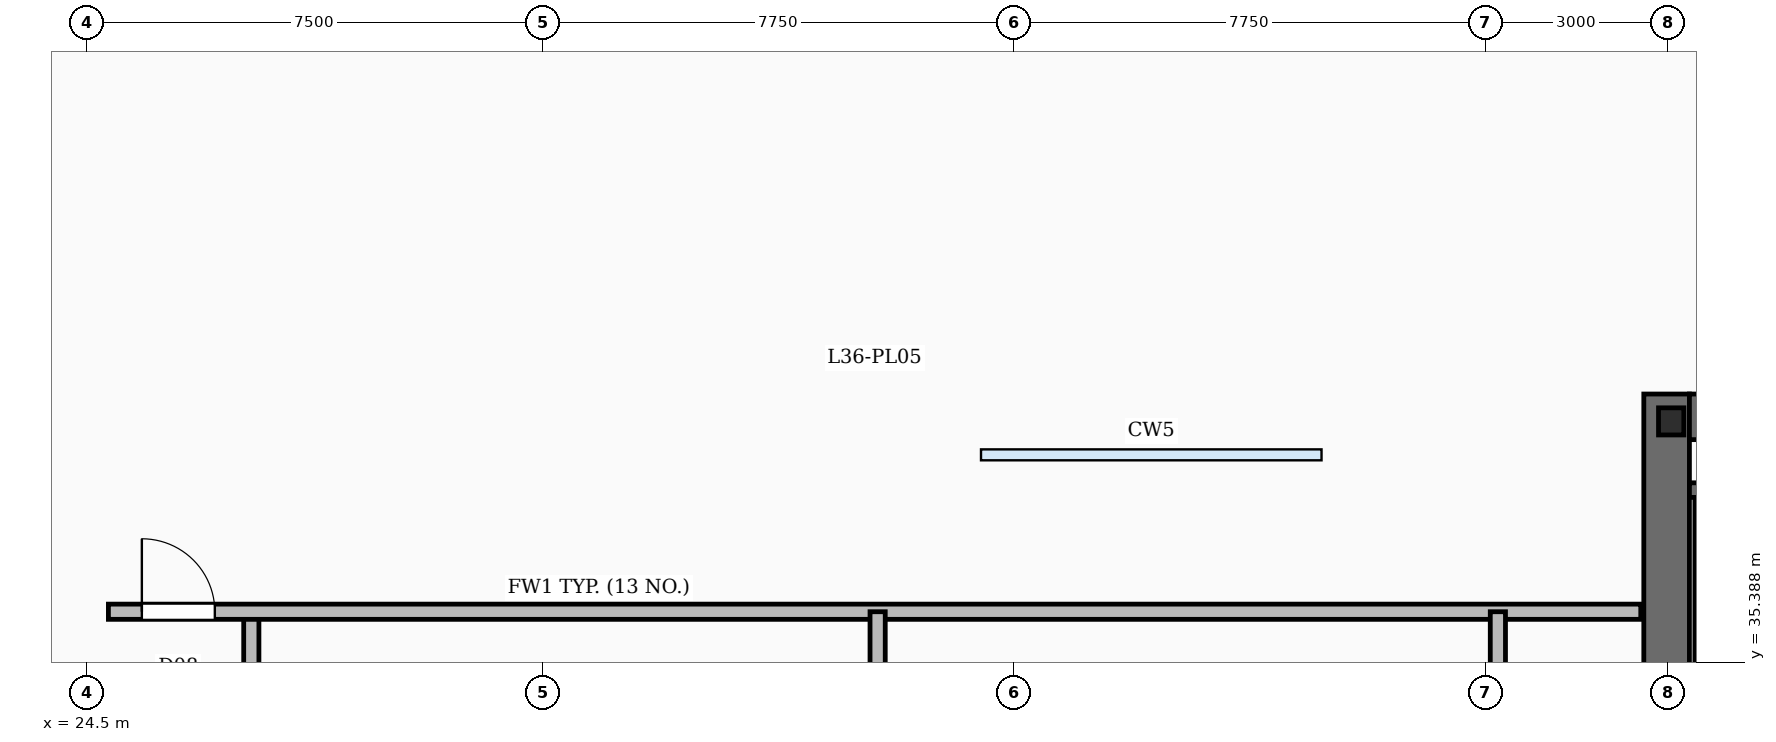
"""IFC4 building model, lengths in metres.
Left out: names, types, materials, properties, quantities, classifications, styles, units other than length and angle.
Written with IfcOpenShell. Run it as: python <this file> out.ifc"""

import sys

from ifc_helpers import new_model, si_unit, direction, frame, frame_2d, origin, origin_2d, place, context, subcontext, project, spatial, rectangle, i_section, extrude, element, fill, save


model = new_model("IFC4")
c1 = context("Model", 3, precision=1e-05, world=origin(), true_north=direction((0.0, 1.0)))
c2 = subcontext(c1, "Body", "Model", "MODEL_VIEW")
j1 = project(units=[si_unit("LENGTHUNIT", "METRE"), si_unit("PLANEANGLEUNIT", "RADIAN")], contexts=[c1])
p1 = place(None, origin())
s1 = spatial("IfcSite", under=j1, at=p1, CompositionType="ELEMENT")
p2 = place(p1, origin())
s2 = spatial("IfcBuilding", under=s1, at=p2, CompositionType="ELEMENT")
p3 = place(p2, frame((0.0, 0.0, 153.25)))
s3 = spatial("IfcBuildingStorey", under=s2, at=p3, CompositionType="ELEMENT", Elevation=153.25)
p4 = place(p3, frame((50.475, 19.0, -0.42), z_axis=(0.0, 0.0, 1.0), x_axis=(0.0, 1.0, 0.0)))
e1 = element("IfcWall", 1, at=p4, inside=s3, PredefinedType="SHEAR", context=c2, shape_type="SweptSolid", body=[
    extrude(rectangle(XDim=20.8, YDim=0.75, at=frame_2d((10.4, 0.0))), origin(), (0.0, 0.0, 1.0), 5.17),
])
p5 = place(p4, frame((2.5, 0.0, 0.42)))
e2 = element("IfcOpeningElement", 2, at=p5, cuts=e1, PredefinedType="OPENING", context=c2, shape_type="SweptSolid", body=[
    extrude(rectangle(XDim=1.05, YDim=2.15, at=frame_2d((0.525, 1.075))), frame((0.0, 0.385, 0.0), z_axis=(0.0, -1.0, 0.0), x_axis=(1.0, 0.0, 0.0)), (0.0, 0.0, 1.0), 0.77),
])
p6 = place(p4, frame((8.65, 0.0, 0.42)))
e3 = element("IfcOpeningElement", 3, at=p6, cuts=e1, PredefinedType="OPENING", context=c2, shape_type="SweptSolid", body=[
    extrude(rectangle(XDim=1.05, YDim=2.15, at=frame_2d((0.525, 1.075))), frame((0.0, 0.385, 0.0), z_axis=(0.0, -1.0, 0.0), x_axis=(1.0, 0.0, 0.0)), (0.0, 0.0, 1.0), 0.77),
])
p7 = place(p4, frame((14.62, 0.0, 0.42)))
e4 = element("IfcOpeningElement", 4, at=p7, cuts=e1, PredefinedType="OPENING", context=c2, shape_type="SweptSolid", body=[
    extrude(rectangle(XDim=1.1, YDim=2.15, at=frame_2d((0.55, 1.075))), frame((0.0, 0.385, 0.0), z_axis=(0.0, -1.0, 0.0), x_axis=(1.0, 0.0, 0.0)), (0.0, 0.0, 1.0), 0.77),
])
p8 = place(p3, frame((50.85, 39.425, -0.42), z_axis=(0.0, 0.0, 1.0), x_axis=(1.0, 0.0, 0.0)))
e5 = element("IfcWall", 5, at=p8, inside=s3, PredefinedType="SHEAR", context=c2, shape_type="SweptSolid", body=[
    extrude(rectangle(XDim=9.2, YDim=0.75, at=frame_2d((4.6, 0.0))), origin(), (0.0, 0.0, 1.0), 5.17),
])
p9 = place(p3, frame((50.55, 39.35, -0.42), z_axis=(0.0, 0.0, 1.0), x_axis=(1.0, 0.0, 0.0)))
e6 = element("IfcColumn", 6, at=p9, inside=s3, PredefinedType="COLUMN", context=c2, shape_type="SweptSolid", body=[
    extrude(i_section(OverallWidth=0.416, OverallDepth=0.446, WebThickness=0.039, FlangeThickness=0.063, FilletRadius=0.02, at=origin_2d()), origin(), (0.0, 0.0, 1.0), 5.17),
])
p10 = place(p3, frame((50.85, 38.22, 0.0), z_axis=(0.0, 0.0, 1.0), x_axis=(1.0, 0.0, 0.0)))
e7 = element("IfcWall", 7, at=p10, inside=s3, PredefinedType="SOLIDWALL", context=c2, shape_type="SweptSolid", body=[
    extrude(rectangle(XDim=9.2, YDim=0.24, at=frame_2d((4.6, 0.0))), origin(), (0.0, 0.0, 1.0), 4.75),
])
p11 = place(p3, frame((51.06, 34.95, 0.0), z_axis=(0.0, 0.0, 1.0), x_axis=(0.0, 1.0, 0.0)))
e8 = element("IfcWall", 8, at=p11, inside=s3, PredefinedType="SOLIDWALL", context=c2, shape_type="SweptSolid", body=[
    extrude(rectangle(XDim=3.15, YDim=0.24, at=frame_2d((1.575, 0.0))), origin(), (0.0, 0.0, 1.0), 4.75),
])
p12 = place(p3, frame((37.5, 15.38, 0.0), z_axis=(0.0, 0.0, 1.0), x_axis=(0.0, 1.0, 0.0)))
e9 = element("IfcWall", 9, at=p12, inside=s3, PredefinedType="SOLIDWALL", context=c2, shape_type="SweptSolid", body=[
    extrude(rectangle(XDim=20.84, YDim=0.25, at=frame_2d((10.42, 0.0))), origin(), (0.0, 0.0, 1.0), 3.81),
])
p13 = place(p3, frame((24.85, 36.22, 0.0), z_axis=(0.0, 0.0, 1.0), x_axis=(1.0, 0.0, 0.0)))
e10 = element("IfcWall", 10, at=p13, inside=s3, PredefinedType="SOLIDWALL", context=c2, shape_type="SweptSolid", body=[
    extrude(rectangle(XDim=25.2, YDim=0.25, at=frame_2d((12.6, 0.0))), origin(), (0.0, 0.0, 1.0), 3.81),
])
p14 = place(p13, frame((0.55, 0.0, 0.0)))
e11 = element("IfcOpeningElement", 11, at=p14, cuts=e10, PredefinedType="OPENING", context=c2, shape_type="SweptSolid", body=[
    extrude(rectangle(XDim=1.2, YDim=2.2, at=frame_2d((0.6, 1.1))), frame((0.0, 0.135, 0.0), z_axis=(0.0, -1.0, 0.0), x_axis=(1.0, 0.0, 0.0)), (0.0, 0.0, 1.0), 0.27),
])
p15 = place(p3, frame((27.2, 15.38, 0.0), z_axis=(0.0, 0.0, 1.0), x_axis=(0.0, 1.0, 0.0)))
e12 = element("IfcWall", 12, at=p15, inside=s3, PredefinedType="SOLIDWALL", context=c2, shape_type="SweptSolid", body=[
    extrude(rectangle(XDim=20.84, YDim=0.25, at=frame_2d((10.42, 0.0))), origin(), (0.0, 0.0, 1.0), 3.81),
])
p16 = place(p15, frame((4.8, 0.0, 0.0)))
e13 = element("IfcOpeningElement", 13, at=p16, cuts=e12, PredefinedType="OPENING", context=c2, shape_type="SweptSolid", body=[
    extrude(rectangle(XDim=1.2, YDim=2.2, at=frame_2d((0.6, 1.1))), frame((0.0, 0.135, 0.0), z_axis=(0.0, -1.0, 0.0), x_axis=(1.0, 0.0, 0.0)), (0.0, 0.0, 1.0), 0.27),
])
p17 = place(p15, frame((14.5, 0.0, 0.0)))
e14 = element("IfcOpeningElement", 14, at=p17, cuts=e12, PredefinedType="OPENING", context=c2, shape_type="SweptSolid", body=[
    extrude(rectangle(XDim=1.2, YDim=2.2, at=frame_2d((0.6, 1.1))), frame((0.0, 0.135, 0.0), z_axis=(0.0, -1.0, 0.0), x_axis=(1.0, 0.0, 0.0)), (0.0, 0.0, 1.0), 0.27),
])
p18 = place(p3, frame((47.7, 15.38, 0.0), z_axis=(0.0, 0.0, 1.0), x_axis=(0.0, 1.0, 0.0)))
e15 = element("IfcWall", 15, at=p18, inside=s3, PredefinedType="SOLIDWALL", context=c2, shape_type="SweptSolid", body=[
    extrude(rectangle(XDim=20.84, YDim=0.25, at=frame_2d((10.42, 0.0))), origin(), (0.0, 0.0, 1.0), 3.81),
])
p19 = place(p18, frame((4.8, 0.0, 0.0)))
e16 = element("IfcOpeningElement", 16, at=p19, cuts=e15, PredefinedType="OPENING", context=c2, shape_type="SweptSolid", body=[
    extrude(rectangle(XDim=1.2, YDim=2.2, at=frame_2d((0.6, 1.1))), frame((0.0, 0.135, 0.0), z_axis=(0.0, -1.0, 0.0), x_axis=(1.0, 0.0, 0.0)), (0.0, 0.0, 1.0), 0.27),
])
p20 = place(p18, frame((14.5, 0.0, 0.0)))
e17 = element("IfcOpeningElement", 17, at=p20, cuts=e15, PredefinedType="OPENING", context=c2, shape_type="SweptSolid", body=[
    extrude(rectangle(XDim=1.2, YDim=2.2, at=frame_2d((0.6, 1.1))), frame((0.0, 0.135, 0.0), z_axis=(0.0, -1.0, 0.0), x_axis=(1.0, 0.0, 0.0)), (0.0, 0.0, 1.0), 0.27),
])
p21 = place(p14, origin())
e18 = element("IfcDoor", 18, at=p21, inside=s3, OperationType="SINGLE_SWING_LEFT", PredefinedType="DOOR", context=c2, shape_type="SweptSolid", body=[
    extrude(rectangle(XDim=1.2, YDim=2.2, at=frame_2d((0.6, 1.1))), frame((0.0, 0.025, 0.0), z_axis=(0.0, -1.0, 0.0), x_axis=(1.0, 0.0, 0.0)), (0.0, 0.0, 1.0), 0.05),
])
fill(e11, e18)
save(model, sys.argv[1])
